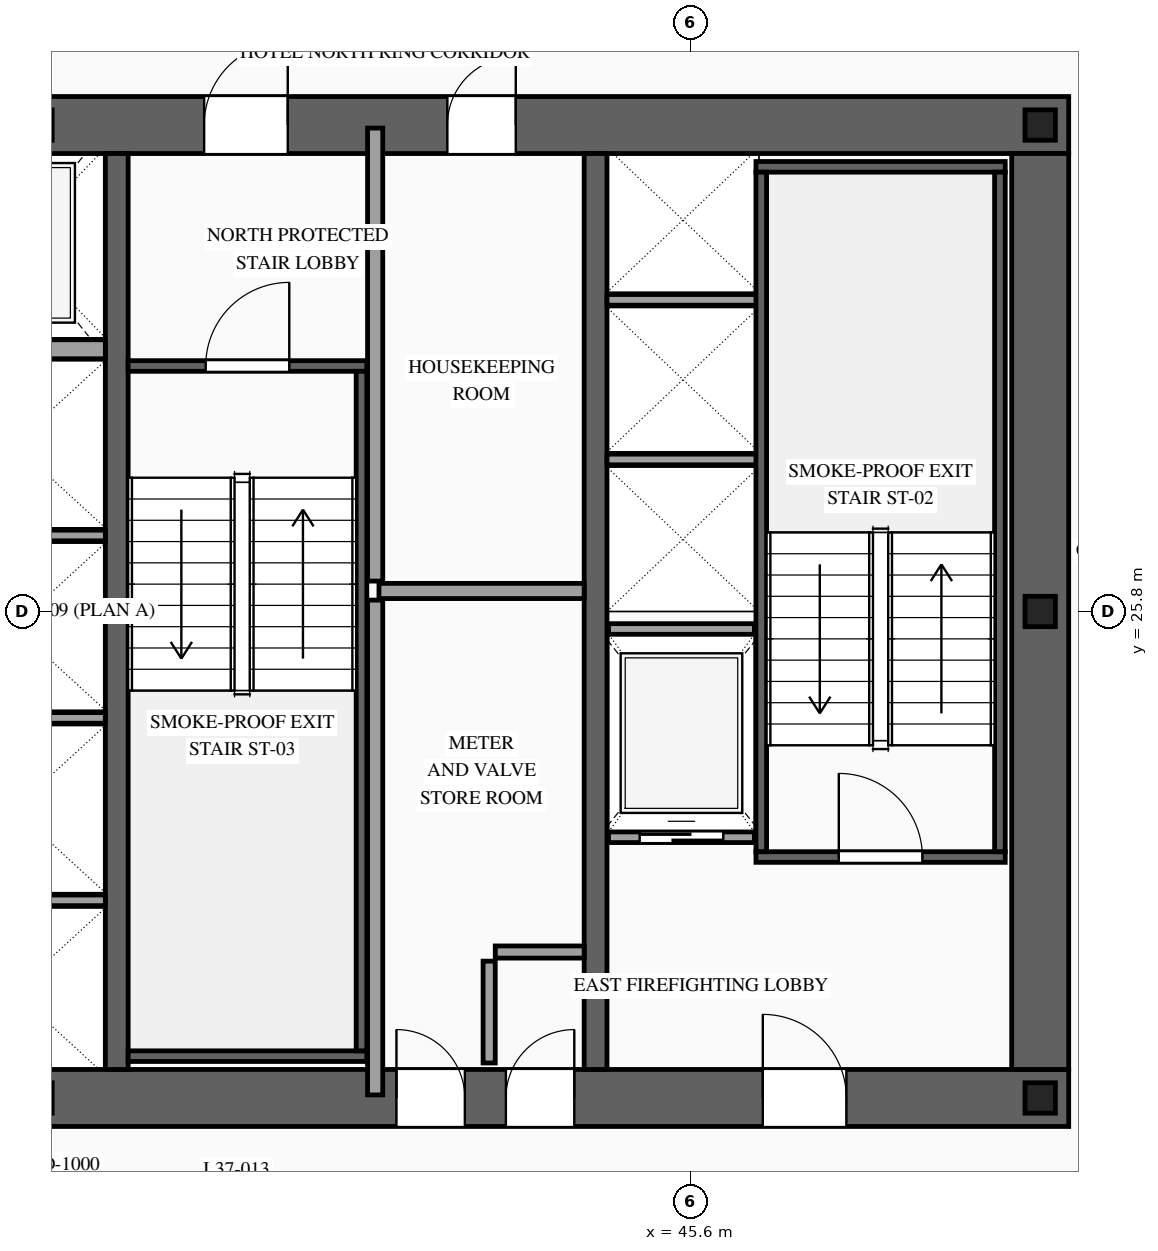
"""IFC4 building model, lengths in metres.
Left out: names, types, materials, properties, quantities, classifications, styles, units other than length and angle.
Written with IfcOpenShell. Run it as: python <this file> out.ifc"""

import sys

from ifc_helpers import new_model, si_unit, direction, frame, frame_2d, origin, origin_2d, place, context, subcontext, project, spatial, rectangle, i_section, extrude, source, transform, mapped, element, fill, save


model = new_model("IFC4")
c1 = context("Model", 3, precision=1e-05, world=origin(), true_north=direction((0.0, 1.0)))
c2 = subcontext(c1, "Body", "Model", "MODEL_VIEW")
j1 = project(units=[si_unit("LENGTHUNIT", "METRE"), si_unit("PLANEANGLEUNIT", "RADIAN")], contexts=[c1])
p1 = place(None, origin())
s1 = spatial("IfcSite", under=j1, at=p1, CompositionType="ELEMENT")
p2 = place(p1, origin())
s2 = spatial("IfcBuilding", under=s1, at=p2, CompositionType="ELEMENT")
p3 = place(p2, frame((0.0, 0.0, 141.6)))
s3 = spatial("IfcBuildingStorey", under=s2, at=p3, CompositionType="ELEMENT", Elevation=141.6)
p4 = place(p3, frame((23.425, 19.4, 0.0), z_axis=(0.0, 0.0, 1.0), x_axis=(1.0, 0.0, 0.0)))
e1 = element("IfcWall", 1, at=p4, inside=s3, PredefinedType="SHEAR", context=c2, shape_type="SweptSolid", body=[
    extrude(rectangle(XDim=27.15, YDim=0.75, at=frame_2d((13.575, 0.0))), origin(), (0.0, 0.0, 1.0), 3.6),
])
p5 = place(p4, frame((2.025, 0.0, 0.0)))
e2 = element("IfcOpeningElement", 2, at=p5, cuts=e1, PredefinedType="OPENING", context=c2, shape_type="SweptSolid", body=[
    extrude(rectangle(XDim=1.1, YDim=2.2, at=frame_2d((0.55, 1.1))), frame((0.0, 0.39, 0.0), z_axis=(0.0, -1.0, 0.0), x_axis=(1.0, 0.0, 0.0)), (0.0, 0.0, 1.0), 0.78),
])
p6 = place(p4, frame((9.925, 0.0, 0.0)))
e3 = element("IfcOpeningElement", 3, at=p6, cuts=e1, PredefinedType="OPENING", context=c2, shape_type="SweptSolid", body=[
    extrude(rectangle(XDim=1.1, YDim=2.2, at=frame_2d((0.55, 1.1))), frame((0.0, 0.39, 0.0), z_axis=(0.0, -1.0, 0.0), x_axis=(1.0, 0.0, 0.0)), (0.0, 0.0, 1.0), 0.78),
])
p7 = place(p4, frame((23.125, 0.0, 0.0)))
e4 = element("IfcOpeningElement", 4, at=p7, cuts=e1, PredefinedType="OPENING", context=c2, shape_type="SweptSolid", body=[
    extrude(rectangle(XDim=1.1, YDim=2.2, at=frame_2d((0.55, 1.1))), frame((0.0, 0.39, 0.0), z_axis=(0.0, -1.0, 0.0), x_axis=(1.0, 0.0, 0.0)), (0.0, 0.0, 1.0), 0.78),
])
p8 = place(p4, frame((19.745, 0.0, 0.0)))
e5 = element("IfcOpeningElement", 5, at=p8, cuts=e1, PredefinedType="OPENING", context=c2, shape_type="SweptSolid", body=[
    extrude(rectangle(XDim=0.9, YDim=2.15, at=frame_2d((0.45, 1.075))), frame((0.0, 0.39, 0.0), z_axis=(0.0, -1.0, 0.0), x_axis=(1.0, 0.0, 0.0)), (0.0, 0.0, 1.0), 0.78),
])
p9 = place(p4, frame((18.305, 0.0, 0.0)))
e6 = element("IfcOpeningElement", 6, at=p9, cuts=e1, PredefinedType="OPENING", context=c2, shape_type="SweptSolid", body=[
    extrude(rectangle(XDim=0.9, YDim=2.15, at=frame_2d((0.45, 1.075))), frame((0.0, 0.39, 0.0), z_axis=(0.0, -1.0, 0.0), x_axis=(1.0, 0.0, 0.0)), (0.0, 0.0, 1.0), 0.78),
])
p10 = place(p3, frame((23.425, 32.2, 0.0), z_axis=(0.0, 0.0, 1.0), x_axis=(1.0, 0.0, 0.0)))
e7 = element("IfcWall", 7, at=p10, inside=s3, PredefinedType="SHEAR", context=c2, shape_type="SweptSolid", body=[
    extrude(rectangle(XDim=27.15, YDim=0.75, at=frame_2d((13.575, 0.0))), origin(), (0.0, 0.0, 1.0), 3.6),
])
p11 = place(p10, frame((4.645, 0.0, 0.0)))
e8 = element("IfcOpeningElement", 8, at=p11, cuts=e7, PredefinedType="OPENING", context=c2, shape_type="SweptSolid", body=[
    extrude(rectangle(XDim=0.9, YDim=2.15, at=frame_2d((0.45, 1.075))), frame((0.0, 0.39, 0.0), z_axis=(0.0, -1.0, 0.0), x_axis=(1.0, 0.0, 0.0)), (0.0, 0.0, 1.0), 0.78),
])
p12 = place(p10, frame((9.925, 0.0, 0.0)))
e9 = element("IfcOpeningElement", 9, at=p12, cuts=e7, PredefinedType="OPENING", context=c2, shape_type="SweptSolid", body=[
    extrude(rectangle(XDim=1.1, YDim=2.2, at=frame_2d((0.55, 1.1))), frame((0.0, 0.39, 0.0), z_axis=(0.0, -1.0, 0.0), x_axis=(1.0, 0.0, 0.0)), (0.0, 0.0, 1.0), 0.78),
])
p13 = place(p10, frame((15.775, 0.0, 0.0)))
e10 = element("IfcOpeningElement", 10, at=p13, cuts=e7, PredefinedType="OPENING", context=c2, shape_type="SweptSolid", body=[
    extrude(rectangle(XDim=1.1, YDim=2.2, at=frame_2d((0.55, 1.1))), frame((0.0, 0.39, 0.0), z_axis=(0.0, -1.0, 0.0), x_axis=(1.0, 0.0, 0.0)), (0.0, 0.0, 1.0), 0.78),
])
p14 = place(p10, frame((18.975, 0.0, 0.0)))
e11 = element("IfcOpeningElement", 11, at=p14, cuts=e7, PredefinedType="OPENING", context=c2, shape_type="SweptSolid", body=[
    extrude(rectangle(XDim=0.9, YDim=2.15, at=frame_2d((0.45, 1.075))), frame((0.0, 0.39, 0.0), z_axis=(0.0, -1.0, 0.0), x_axis=(1.0, 0.0, 0.0)), (0.0, 0.0, 1.0), 0.78),
])
m1 = source(origin(), c2, "Body", "SweptSolid", [
    extrude(rectangle(XDim=12.05, YDim=0.75, at=frame_2d((6.025, 0.0))), origin(), (0.0, 0.0, 1.0), 3.6),
])
p15 = place(p3, frame((50.2, 19.775, 0.0), z_axis=(0.0, 0.0, 1.0), x_axis=(0.0, 1.0, 0.0)))
e12 = element("IfcWall", 12, at=p15, inside=s3, PredefinedType="SHEAR", context=c2, shape_type="MappedRepresentation", body=[
    mapped(m1, transform((0.0, 0.0, 0.0), scale=1.0)),
])
m2 = source(origin(), c2, "Body", "SweptSolid", [
    extrude(rectangle(XDim=12.05, YDim=0.3, at=frame_2d((6.025, 0.0))), origin(), (0.0, 0.0, 1.0), 3.6),
])
for number, where, z_axis, x_axis in (
    (13, (38.05, 19.775, 0.0), (0.0, 0.0, 1.0), (0.0, 1.0, 0.0)),
    (14, (44.35, 19.775, 0.0), (0.0, 0.0, 1.0), (0.0, 1.0, 0.0)),
):
    element("IfcWall", number, at=place(p3, frame(where, z_axis=z_axis, x_axis=x_axis)), inside=s3, PredefinedType="SOLIDWALL", context=c2, shape_type="MappedRepresentation", body=[
        mapped(m2, transform((0.0, 0.0, 0.0), scale=1.0)),
    ])
m3 = source(origin(), c2, "Body", "SweptSolid", [
    extrude(i_section(OverallWidth=0.4, OverallDepth=0.4, WebThickness=0.013, FlangeThickness=0.021, at=origin_2d()), origin(), (0.0, 0.0, 1.0), 3.6),
])
for number, where, z_axis, x_axis in (
    (15, (50.2, 19.4, 0.0), (0.0, 0.0, 1.0), (1.0, 0.0, 0.0)),
    (16, (50.2, 25.8, 0.0), (0.0, 0.0, 1.0), (1.0, 0.0, 0.0)),
    (17, (50.2, 32.2, 0.0), (0.0, 0.0, 1.0), (1.0, 0.0, 0.0)),
):
    element("IfcColumn", number, at=place(p3, frame(where, z_axis=z_axis, x_axis=x_axis)), inside=s3, PredefinedType="COLUMN", context=c2, shape_type="MappedRepresentation", body=[
        mapped(m3, transform((0.0, 0.0, 0.0), scale=1.0)),
    ])
p16 = place(p3, frame((44.52, 22.83, 0.0), z_axis=(0.0, 0.0, 1.0), x_axis=(1.0, 0.0, 0.0)))
e18 = element("IfcWall", 18, at=p16, inside=s3, PredefinedType="SOLIDWALL", context=c2, shape_type="SweptSolid", body=[
    extrude(rectangle(XDim=1.92, YDim=0.14, at=frame_2d((0.96, 0.0))), origin(), (0.0, 0.0, 1.0), 3.38),
])
p17 = place(p16, frame((0.41, 0.0, 0.0)))
e19 = element("IfcOpeningElement", 19, at=p17, cuts=e18, PredefinedType="OPENING", context=c2, shape_type="SweptSolid", body=[
    extrude(rectangle(XDim=1.1, YDim=2.2, at=frame_2d((0.55, 1.1))), frame((0.0, 0.085, 0.0), z_axis=(0.0, -1.0, 0.0), x_axis=(1.0, 0.0, 0.0)), (0.0, 0.0, 1.0), 0.17),
])
m4 = source(origin(), c2, "Body", "SweptSolid", [
    extrude(rectangle(XDim=1.92, YDim=0.14, at=frame_2d((0.96, 0.0))), origin(), (0.0, 0.0, 1.0), 3.38),
])
p18 = place(p3, frame((44.52, 25.57, 0.0), z_axis=(0.0, 0.0, 1.0), x_axis=(1.0, 0.0, 0.0)))
e20 = element("IfcWall", 20, at=p18, inside=s3, PredefinedType="SOLIDWALL", context=c2, shape_type="MappedRepresentation", body=[
    mapped(m4, transform((0.0, 0.0, 0.0), scale=1.0)),
])
m5 = source(origin(), c2, "Body", "SweptSolid", [
    extrude(rectangle(XDim=2.4, YDim=0.14, at=frame_2d((1.2, 0.0))), origin(), (0.0, 0.0, 1.0), 3.38),
])
for number, where, z_axis, x_axis in (
    (21, (35.5, 22.0, 0.0), (0.0, 0.0, 1.0), (1.0, 0.0, 0.0)),
    (22, (35.5, 24.4, 0.0), (0.0, 0.0, 1.0), (1.0, 0.0, 0.0)),
    (23, (35.5, 26.8, 0.0), (0.0, 0.0, 1.0), (1.0, 0.0, 0.0)),
):
    element("IfcWall", number, at=place(p3, frame(where, z_axis=z_axis, x_axis=x_axis)), inside=s3, PredefinedType="SOLIDWALL", context=c2, shape_type="MappedRepresentation", body=[
        mapped(m5, transform((0.0, 0.0, 0.0), scale=1.0)),
    ])
m6 = source(origin(), c2, "Body", "SweptSolid", [
    extrude(rectangle(XDim=2.4, YDim=0.25, at=frame_2d((1.2, 0.0))), origin(), (0.0, 0.0, 1.0), 3.38),
])
p19 = place(p3, frame((35.5, 29.25, 0.0), z_axis=(0.0, 0.0, 1.0), x_axis=(1.0, 0.0, 0.0)))
e24 = element("IfcWall", 24, at=p19, inside=s3, PredefinedType="SOLIDWALL", context=c2, shape_type="MappedRepresentation", body=[
    mapped(m6, transform((0.0, 0.0, 0.0), scale=1.0)),
])
m7 = source(origin(), c2, "Body", "SweptSolid", [
    extrude(rectangle(XDim=2.0, YDim=0.14, at=frame_2d((1.0, 0.0))), origin(), (0.0, 0.0, 1.0), 3.38),
])
for number, where, z_axis, x_axis in (
    (25, (44.5, 27.8, 0.0), (0.0, 0.0, 1.0), (1.0, 0.0, 0.0)),
    (26, (44.5, 29.9, 0.0), (0.0, 0.0, 1.0), (1.0, 0.0, 0.0)),
):
    element("IfcWall", number, at=place(p3, frame(where, z_axis=z_axis, x_axis=x_axis)), inside=s3, PredefinedType="SOLIDWALL", context=c2, shape_type="MappedRepresentation", body=[
        mapped(m7, transform((0.0, 0.0, 0.0), scale=1.0)),
    ])
p20 = place(p3, frame((46.46, 22.57, 0.0), z_axis=(0.0, 0.0, 1.0), x_axis=(1.0, 0.0, 0.0)))
e27 = element("IfcWall", 27, at=p20, inside=s3, PredefinedType="SOLIDWALL", context=c2, shape_type="SweptSolid", body=[
    extrude(rectangle(XDim=3.28, YDim=0.14, at=frame_2d((1.64, 0.0))), origin(), (0.0, 0.0, 1.0), 3.38),
])
p21 = place(p20, frame((1.09, 0.0, 0.0)))
e28 = element("IfcOpeningElement", 28, at=p21, cuts=e27, PredefinedType="OPENING", context=c2, shape_type="SweptSolid", body=[
    extrude(rectangle(XDim=1.1, YDim=2.2, at=frame_2d((0.55, 1.1))), frame((0.0, 0.085, 0.0), z_axis=(0.0, -1.0, 0.0), x_axis=(1.0, 0.0, 0.0)), (0.0, 0.0, 1.0), 0.17),
])
m8 = source(origin(), c2, "Body", "SweptSolid", [
    extrude(rectangle(XDim=3.28, YDim=0.14, at=frame_2d((1.64, 0.0))), origin(), (0.0, 0.0, 1.0), 3.38),
])
p22 = place(p3, frame((46.46, 31.65, 0.0), z_axis=(0.0, 0.0, 1.0), x_axis=(1.0, 0.0, 0.0)))
e29 = element("IfcWall", 29, at=p22, inside=s3, PredefinedType="SOLIDWALL", context=c2, shape_type="MappedRepresentation", body=[
    mapped(m8, transform((0.0, 0.0, 0.0), scale=1.0)),
])
m9 = source(origin(), c2, "Body", "SweptSolid", [
    extrude(rectangle(XDim=8.94, YDim=0.14, at=frame_2d((4.47, 0.0))), origin(), (0.0, 0.0, 1.0), 3.38),
])
for number, where, z_axis, x_axis in (
    (30, (46.53, 22.64, 0.0), (0.0, 0.0, 1.0), (0.0, 1.0, 0.0)),
    (31, (49.67, 22.64, 0.0), (0.0, 0.0, 1.0), (0.0, 1.0, 0.0)),
):
    element("IfcWall", number, at=place(p3, frame(where, z_axis=z_axis, x_axis=x_axis)), inside=s3, PredefinedType="SOLIDWALL", context=c2, shape_type="MappedRepresentation", body=[
        mapped(m9, transform((0.0, 0.0, 0.0), scale=1.0)),
    ])
p23 = place(p3, frame((38.2, 29.03, 0.0), z_axis=(0.0, 0.0, 1.0), x_axis=(1.0, 0.0, 0.0)))
e32 = element("IfcWall", 32, at=p23, inside=s3, PredefinedType="SOLIDWALL", context=c2, shape_type="SweptSolid", body=[
    extrude(rectangle(XDim=3.14, YDim=0.14, at=frame_2d((1.57, 0.0))), origin(), (0.0, 0.0, 1.0), 3.38),
])
p24 = place(p23, frame((1.02, 0.0, 0.0)))
e33 = element("IfcOpeningElement", 33, at=p24, cuts=e32, PredefinedType="OPENING", context=c2, shape_type="SweptSolid", body=[
    extrude(rectangle(XDim=1.1, YDim=2.2, at=frame_2d((0.55, 1.1))), frame((0.0, 0.085, 0.0), z_axis=(0.0, -1.0, 0.0), x_axis=(1.0, 0.0, 0.0)), (0.0, 0.0, 1.0), 0.17),
])
m10 = source(origin(), c2, "Body", "SweptSolid", [
    extrude(rectangle(XDim=3.14, YDim=0.14, at=frame_2d((1.57, 0.0))), origin(), (0.0, 0.0, 1.0), 3.38),
])
p25 = place(p3, frame((38.2, 19.95, 0.0), z_axis=(0.0, 0.0, 1.0), x_axis=(1.0, 0.0, 0.0)))
e34 = element("IfcWall", 34, at=p25, inside=s3, PredefinedType="SOLIDWALL", context=c2, shape_type="MappedRepresentation", body=[
    mapped(m10, transform((0.0, 0.0, 0.0), scale=1.0)),
])
m11 = source(origin(), c2, "Body", "SweptSolid", [
    extrude(rectangle(XDim=8.94, YDim=0.14, at=frame_2d((4.47, 0.0))), origin(), (0.0, 0.0, 1.0), 3.38),
])
p26 = place(p3, frame((41.27, 20.02, 0.0), z_axis=(0.0, 0.0, 1.0), x_axis=(0.0, 1.0, 0.0)))
e35 = element("IfcWall", 35, at=p26, inside=s3, PredefinedType="SOLIDWALL", context=c2, shape_type="MappedRepresentation", body=[
    mapped(m11, transform((0.0, 0.0, 0.0), scale=1.0)),
])
m12 = source(origin(), c2, "Body", "SweptSolid", [
    extrude(rectangle(XDim=1.34, YDim=0.16, at=frame_2d((0.67, 0.0))), origin(), (0.0, 0.0, 1.0), 3.38),
])
p27 = place(p3, frame((42.95, 19.86, 0.0), z_axis=(0.0, 0.0, 1.0), x_axis=(0.0, 1.0, 0.0)))
e36 = element("IfcWall", 36, at=p27, inside=s3, PredefinedType="PARTITIONING", context=c2, shape_type="MappedRepresentation", body=[
    mapped(m12, transform((0.0, 0.0, 0.0), scale=1.0)),
])
m13 = source(origin(), c2, "Body", "SweptSolid", [
    extrude(rectangle(XDim=1.17, YDim=0.16, at=frame_2d((0.585, 0.0))), origin(), (0.0, 0.0, 1.0), 3.38),
])
p28 = place(p3, frame((43.03, 21.32, 0.0), z_axis=(0.0, 0.0, 1.0), x_axis=(1.0, 0.0, 0.0)))
e37 = element("IfcWall", 37, at=p28, inside=s3, PredefinedType="PARTITIONING", context=c2, shape_type="MappedRepresentation", body=[
    mapped(m13, transform((0.0, 0.0, 0.0), scale=1.0)),
])
m14 = source(origin(), c2, "Body", "SweptSolid", [
    extrude(rectangle(XDim=6.51, YDim=0.2, at=frame_2d((3.255, 0.0))), origin(), (0.0, 0.0, 1.0), 3.38),
])
p29 = place(p3, frame((41.45, 19.44, 0.0), z_axis=(0.0, 0.0, 1.0), x_axis=(0.0, 1.0, 0.0)))
e38 = element("IfcWall", 38, at=p29, inside=s3, PredefinedType="PARTITIONING", context=c2, shape_type="MappedRepresentation", body=[
    mapped(m14, transform((0.0, 0.0, 0.0), scale=1.0)),
])
m15 = source(origin(), c2, "Body", "SweptSolid", [
    extrude(rectangle(XDim=2.7, YDim=0.2, at=frame_2d((1.35, 0.0))), origin(), (0.0, 0.0, 1.0), 3.38),
])
p30 = place(p3, frame((41.5, 26.07, 0.0), z_axis=(0.0, 0.0, 1.0), x_axis=(1.0, 0.0, 0.0)))
e39 = element("IfcWall", 39, at=p30, inside=s3, PredefinedType="PARTITIONING", context=c2, shape_type="MappedRepresentation", body=[
    mapped(m15, transform((0.0, 0.0, 0.0), scale=1.0)),
])
m16 = source(origin(), c2, "Body", "SweptSolid", [
    extrude(rectangle(XDim=5.96, YDim=0.2, at=frame_2d((2.98, 0.0))), origin(), (0.0, 0.0, 1.0), 3.38),
])
p31 = place(p3, frame((41.45, 26.2, 0.0), z_axis=(0.0, 0.0, 1.0), x_axis=(0.0, 1.0, 0.0)))
e40 = element("IfcWall", 40, at=p31, inside=s3, PredefinedType="PARTITIONING", context=c2, shape_type="MappedRepresentation", body=[
    mapped(m16, transform((0.0, 0.0, 0.0), scale=1.0)),
])
m17 = source(origin(), c2, "Body", "SweptSolid", [
    extrude(rectangle(XDim=1.1, YDim=2.2, at=frame_2d((0.55, 1.1))), frame((0.0, 0.025, 0.0), z_axis=(0.0, -1.0, 0.0), x_axis=(1.0, 0.0, 0.0)), (0.0, 0.0, 1.0), 0.05),
])
p32 = place(p17, origin())
e41 = element("IfcDoor", 41, at=p32, inside=s3, OperationType="SLIDING_TO_RIGHT", PredefinedType="DOOR", context=c2, shape_type="MappedRepresentation", body=[
    mapped(m17, transform((0.0, 0.0, 0.0), scale=1.0)),
])
fill(e19, e41)
m18 = source(origin(), c2, "Body", "SweptSolid", [
    extrude(rectangle(XDim=1.1, YDim=2.2, at=frame_2d((0.55, 1.1))), frame((0.0, 0.025, 0.0), z_axis=(0.0, -1.0, 0.0), x_axis=(1.0, 0.0, 0.0)), (0.0, 0.0, 1.0), 0.05),
])
p33 = place(p21, origin())
e42 = element("IfcDoor", 42, at=p33, inside=s3, OperationType="SINGLE_SWING_LEFT", PredefinedType="DOOR", context=c2, shape_type="MappedRepresentation", body=[
    mapped(m18, transform((0.0, 0.0, 0.0), scale=1.0)),
])
fill(e28, e42)
p34 = place(p24, origin())
e43 = element("IfcDoor", 43, at=p34, inside=s3, OperationType="SINGLE_SWING_RIGHT", PredefinedType="DOOR", context=c2, shape_type="MappedRepresentation", body=[
    mapped(m18, transform((0.0, 0.0, 0.0), scale=1.0)),
])
fill(e33, e43)
p35 = place(p7, origin())
e44 = element("IfcDoor", 44, at=p35, inside=s3, OperationType="SINGLE_SWING_LEFT", PredefinedType="DOOR", context=c2, shape_type="MappedRepresentation", body=[
    mapped(m18, transform((0.0, 0.0, 0.0), scale=1.0)),
])
fill(e4, e44)
p36 = place(p13, origin())
e45 = element("IfcDoor", 45, at=p36, inside=s3, OperationType="SINGLE_SWING_RIGHT", PredefinedType="DOOR", context=c2, shape_type="MappedRepresentation", body=[
    mapped(m18, transform((0.0, 0.0, 0.0), scale=1.0)),
])
fill(e10, e45)
m19 = source(origin(), c2, "Body", "SweptSolid", [
    extrude(rectangle(XDim=0.9, YDim=2.15, at=frame_2d((0.45, 1.075))), frame((0.0, 0.025, 0.0), z_axis=(0.0, -1.0, 0.0), x_axis=(1.0, 0.0, 0.0)), (0.0, 0.0, 1.0), 0.05),
])
p37 = place(p8, origin())
e46 = element("IfcDoor", 46, at=p37, inside=s3, OperationType="SINGLE_SWING_RIGHT", PredefinedType="DOOR", context=c2, shape_type="MappedRepresentation", body=[
    mapped(m19, transform((0.0, 0.0, 0.0), scale=1.0)),
])
fill(e5, e46)
p38 = place(p9, origin())
e47 = element("IfcDoor", 47, at=p38, inside=s3, OperationType="SINGLE_SWING_LEFT", PredefinedType="DOOR", context=c2, shape_type="MappedRepresentation", body=[
    mapped(m19, transform((0.0, 0.0, 0.0), scale=1.0)),
])
fill(e6, e47)
p39 = place(p14, origin())
e48 = element("IfcDoor", 48, at=p39, inside=s3, OperationType="SINGLE_SWING_RIGHT", PredefinedType="DOOR", context=c2, shape_type="MappedRepresentation", body=[
    mapped(m19, transform((0.0, 0.0, 0.0), scale=1.0)),
])
fill(e11, e48)
save(model, sys.argv[1])
